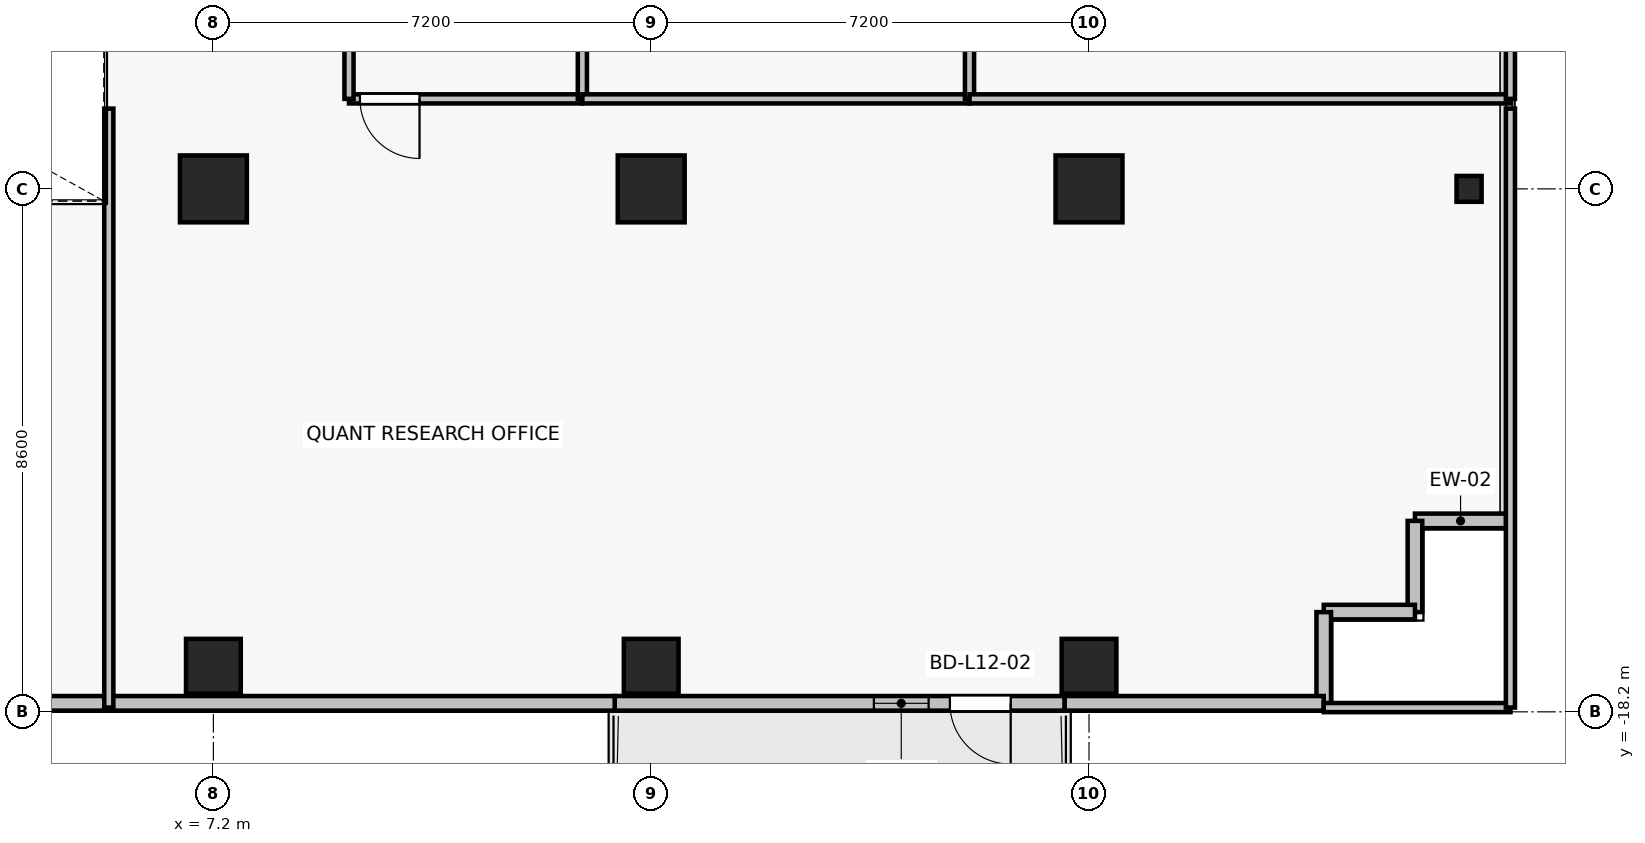
"""IFC4 building model, lengths in metres.
Left out: names, types, materials, properties, quantities, classifications, styles, units other than length and angle.
Written with IfcOpenShell. Run it as: python <this file> out.ifc"""

import sys

from ifc_helpers import new_model, si_unit, direction, frame, frame_2d, origin, origin_2d, place, context, subcontext, project, spatial, rectangle, i_section, extrude, source, transform, mapped, element, fill, save


model = new_model("IFC4")
c1 = context("Model", 3, precision=1e-05, world=origin(), true_north=direction((0.0, 1.0)))
c2 = subcontext(c1, "Body", "Model", "MODEL_VIEW")
j1 = project(units=[si_unit("LENGTHUNIT", "METRE"), si_unit("PLANEANGLEUNIT", "RADIAN")], contexts=[c1])
p1 = place(None, origin())
s1 = spatial("IfcSite", under=j1, at=p1, CompositionType="ELEMENT")
p2 = place(p1, origin())
s2 = spatial("IfcBuilding", under=s1, at=p2, CompositionType="ELEMENT")
p3 = place(p2, frame((0.0, 0.0, 47.2)))
s3 = spatial("IfcBuildingStorey", under=s2, at=p3, CompositionType="ELEMENT", Elevation=47.2)
for number, where, z_axis, x_axis in (
    (1, (7.2, -9.6, 0.0), (0.0, 0.0, 1.0), (1.0, 0.0, 0.0)),
    (2, (14.4, -9.6, 0.0), (0.0, 0.0, 1.0), (1.0, 0.0, 0.0)),
    (3, (21.6, -9.6, 0.0), (0.0, 0.0, 1.0), (1.0, 0.0, 0.0)),
):
    element("IfcColumn", number, at=place(p3, frame(where, z_axis=z_axis, x_axis=x_axis)), inside=s3, PredefinedType="COLUMN", context=c2, shape_type="SweptSolid", body=[
        extrude(rectangle(XDim=1.1, YDim=1.1, at=origin_2d()), origin(), (0.0, 0.0, 1.0), 3.3),
    ])
for number, where, z_axis, x_axis in (
    (4, (7.2, -17.45, 0.0), (0.0, 0.0, 1.0), (1.0, 0.0, 0.0)),
    (5, (14.4, -17.45, 0.0), (0.0, 0.0, 1.0), (1.0, 0.0, 0.0)),
    (6, (21.6, -17.45, 0.0), (0.0, 0.0, 1.0), (1.0, 0.0, 0.0)),
):
    element("IfcColumn", number, at=place(p3, frame(where, z_axis=z_axis, x_axis=x_axis)), inside=s3, PredefinedType="COLUMN", context=c2, shape_type="SweptSolid", body=[
        extrude(rectangle(XDim=0.9, YDim=0.9, at=origin_2d()), origin(), (0.0, 0.0, 1.0), 3.3),
    ])
p4 = place(p3, frame((27.85, -9.6, 0.0), z_axis=(0.0, 0.0, 1.0), x_axis=(1.0, 0.0, 0.0)))
e7 = element("IfcColumn", 7, at=p4, inside=s3, PredefinedType="COLUMN", context=c2, shape_type="SweptSolid", body=[
    extrude(i_section(OverallWidth=0.412, OverallDepth=0.425, WebThickness=0.026, FlangeThickness=0.039, FilletRadius=0.015, at=origin_2d()), origin(), (0.0, 0.0, 1.0), 3.3),
])
p5 = place(p3, frame((21.2, -18.06, 0.0), z_axis=(0.0, 0.0, 1.0), x_axis=(-1.0, 0.0, 0.0)))
e8 = element("IfcWall", 8, at=p5, inside=s3, PredefinedType="SOLIDWALL", context=c2, shape_type="SweptSolid", body=[
    extrude(rectangle(XDim=7.4, YDim=0.24, at=frame_2d((3.7, 0.0))), origin(), (0.0, 0.0, 1.0), 2.665),
])
p6 = place(p5, frame((0.888, 0.0, 0.0)))
e9 = element("IfcOpeningElement", 9, at=p6, cuts=e8, PredefinedType="OPENING", context=c2, shape_type="SweptSolid", body=[
    extrude(rectangle(XDim=1.0, YDim=2.2, at=frame_2d((0.5, 1.1))), frame((0.0, 0.13, 0.0), z_axis=(0.0, -1.0, 0.0), x_axis=(1.0, 0.0, 0.0)), (0.0, 0.0, 1.0), 0.26),
])
p7 = place(p5, frame((2.238, 0.0, 0.85)))
e10 = element("IfcOpeningElement", 10, at=p7, cuts=e8, PredefinedType="OPENING", context=c2, shape_type="SweptSolid", body=[
    extrude(rectangle(XDim=0.9, YDim=1.35, at=frame_2d((0.45, 0.675))), frame((0.0, 0.13, 0.0), z_axis=(0.0, -1.0, 0.0), x_axis=(1.0, 0.0, 0.0)), (0.0, 0.0, 1.0), 0.26),
])
for number, where, z_axis, x_axis in (
    (11, (26.96, -15.06, 0.0), (0.0, 0.0, 1.0), (1.0, 0.0, 0.0)),
    (12, (26.96, -16.56, 0.0), (0.0, 0.0, 1.0), (0.0, 1.0, 0.0)),
    (13, (25.46, -16.56, 0.0), (0.0, 0.0, 1.0), (1.0, 0.0, 0.0)),
    (14, (25.46, -18.06, 0.0), (0.0, 0.0, 1.0), (0.0, 1.0, 0.0)),
):
    element("IfcWall", number, at=place(p3, frame(where, z_axis=z_axis, x_axis=x_axis)), inside=s3, PredefinedType="SOLIDWALL", context=c2, shape_type="SweptSolid", body=[
        extrude(rectangle(XDim=1.5, YDim=0.24, at=frame_2d((0.75, 0.0))), origin(), (0.0, 0.0, 1.0), 3.075),
    ])
p8 = place(p3, frame((21.2, -18.06, 0.0), z_axis=(0.0, 0.0, 1.0), x_axis=(1.0, 0.0, 0.0)))
e15 = element("IfcWall", 15, at=p8, inside=s3, PredefinedType="SOLIDWALL", context=c2, shape_type="SweptSolid", body=[
    extrude(rectangle(XDim=4.26, YDim=0.24, at=frame_2d((2.13, 0.0))), origin(), (0.0, 0.0, 1.0), 3.075),
])
p9 = place(p3, frame((3.34, -18.06, 0.0), z_axis=(0.0, 0.0, 1.0), x_axis=(1.0, 0.0, 0.0)))
e16 = element("IfcWall", 16, at=p9, inside=s3, PredefinedType="SOLIDWALL", context=c2, shape_type="SweptSolid", body=[
    extrude(rectangle(XDim=10.46, YDim=0.24, at=frame_2d((5.23, 0.0))), origin(), (0.0, 0.0, 1.0), 2.665),
])
p10 = place(p3, frame((13.268, -8.12, 0.0), z_axis=(0.0, 0.0, 1.0), x_axis=(-1.0, 0.0, 0.0)))
e17 = element("IfcWall", 17, at=p10, inside=s3, PredefinedType="PARTITIONING", context=c2, shape_type="SweptSolid", body=[
    extrude(rectangle(XDim=3.838, YDim=0.15, at=frame_2d((1.919, 0.0))), origin(), (0.0, 0.0, 1.0), 3.075),
])
p11 = place(p10, frame((2.678, 0.0, 0.0)))
e18 = element("IfcOpeningElement", 18, at=p11, cuts=e17, PredefinedType="OPENING", context=c2, shape_type="SweptSolid", body=[
    extrude(rectangle(XDim=0.98, YDim=2.15, at=frame_2d((0.49, 1.075))), frame((0.0, 0.085, 0.0), z_axis=(0.0, -1.0, 0.0), x_axis=(1.0, 0.0, 0.0)), (0.0, 0.0, 1.0), 0.17),
])
for number, where, z_axis, x_axis in (
    (19, (9.43, -8.12, 0.0), (0.0, 0.0, 1.0), (0.0, 1.0, 0.0)),
    (20, (13.268, -3.83, 0.0), (0.0, 0.0, 1.0), (0.0, -1.0, 0.0)),
):
    element("IfcWall", number, at=place(p3, frame(where, z_axis=z_axis, x_axis=x_axis)), inside=s3, PredefinedType="PARTITIONING", context=c2, shape_type="SweptSolid", body=[
        extrude(rectangle(XDim=4.29, YDim=0.15, at=frame_2d((2.145, 0.0))), origin(), (0.0, 0.0, 1.0), 2.565),
    ])
p12 = place(p3, frame((19.635, -8.12, 0.0), z_axis=(0.0, 0.0, 1.0), x_axis=(-1.0, 0.0, 0.0)))
e21 = element("IfcWall", 21, at=p12, inside=s3, PredefinedType="PARTITIONING", context=c2, shape_type="SweptSolid", body=[
    extrude(rectangle(XDim=6.367, YDim=0.15, at=frame_2d((3.183, 0.0))), origin(), (0.0, 0.0, 1.0), 2.465),
])
p13 = place(p3, frame((19.635, -3.83, 0.0), z_axis=(0.0, 0.0, 1.0), x_axis=(0.0, -1.0, 0.0)))
e22 = element("IfcWall", 22, at=p13, inside=s3, PredefinedType="PARTITIONING", context=c2, shape_type="SweptSolid", body=[
    extrude(rectangle(XDim=4.29, YDim=0.15, at=frame_2d((2.145, 0.0))), origin(), (0.0, 0.0, 1.0), 2.565),
])
p14 = place(p3, frame((28.53, -8.12, 0.0), z_axis=(0.0, 0.0, 1.0), x_axis=(-1.0, 0.0, 0.0)))
e23 = element("IfcWall", 23, at=p14, inside=s3, PredefinedType="PARTITIONING", context=c2, shape_type="SweptSolid", body=[
    extrude(rectangle(XDim=8.895, YDim=0.15, at=frame_2d((4.448, 0.0))), origin(), (0.0, 0.0, 1.0), 2.465),
])
p15 = place(p3, frame((28.53, -3.83, 0.0), z_axis=(0.0, 0.0, 1.0), x_axis=(0.0, -1.0, 0.0)))
e24 = element("IfcWall", 24, at=p15, inside=s3, PredefinedType="PARTITIONING", context=c2, shape_type="SweptSolid", body=[
    extrude(rectangle(XDim=4.29, YDim=0.15, at=frame_2d((2.145, 0.0))), origin(), (0.0, 0.0, 1.0), 2.665),
])
p16 = place(p3, frame((28.53, -18.13, 0.0), z_axis=(0.0, 0.0, 1.0), x_axis=(-1.0, 0.0, 0.0)))
e25 = element("IfcWall", 25, at=p16, inside=s3, PredefinedType="PARTITIONING", context=c2, shape_type="SweptSolid", body=[
    extrude(rectangle(XDim=3.07, YDim=0.15, at=frame_2d((1.535, 0.0))), origin(), (0.0, 0.0, 1.0), 2.665),
])
p17 = place(p3, frame((5.48, -18.13, 0.0), z_axis=(0.0, 0.0, 1.0), x_axis=(0.0, 1.0, 0.0)))
e26 = element("IfcWall", 26, at=p17, inside=s3, PredefinedType="PARTITIONING", context=c2, shape_type="SweptSolid", body=[
    extrude(rectangle(XDim=9.85, YDim=0.15, at=frame_2d((4.925, 0.0))), origin(), (0.0, 0.0, 1.0), 2.465),
])
p18 = place(p3, frame((28.53, -8.28, 0.0), z_axis=(0.0, 0.0, 1.0), x_axis=(0.0, -1.0, 0.0)))
e27 = element("IfcWall", 27, at=p18, inside=s3, PredefinedType="PARTITIONING", context=c2, shape_type="SweptSolid", body=[
    extrude(rectangle(XDim=9.85, YDim=0.15, at=frame_2d((4.925, 0.0))), origin(), (0.0, 0.0, 1.0), 2.665),
])
m1 = source(origin(), c2, "Body", "SweptSolid", [
    extrude(rectangle(XDim=1.0, YDim=2.2, at=frame_2d((0.5, 1.1))), frame((0.0, 0.025, 0.0), z_axis=(0.0, -1.0, 0.0), x_axis=(1.0, 0.0, 0.0)), (0.0, 0.0, 1.0), 0.05),
])
p19 = place(p6, origin())
e28 = element("IfcDoor", 28, at=p19, inside=s3, OperationType="SINGLE_SWING_LEFT", PredefinedType="DOOR", context=c2, shape_type="MappedRepresentation", body=[
    mapped(m1, transform((0.0, 0.0, 0.0), x_axis=(1.0, 0.0, 0.0), y_axis=(0.0, 1.0, 0.0), z_axis=(0.0, 0.0, 1.0), scale=1.0)),
])
fill(e9, e28)
m2 = source(origin(), c2, "Body", "SweptSolid", [
    extrude(rectangle(XDim=0.9, YDim=1.35, at=frame_2d((0.45, 0.675))), frame((0.0, 0.03, 0.0), z_axis=(0.0, -1.0, 0.0), x_axis=(1.0, 0.0, 0.0)), (0.0, 0.0, 1.0), 0.06),
])
p20 = place(p7, origin())
e29 = element("IfcWindow", 29, at=p20, inside=s3, PartitioningType="SINGLE_PANEL", PredefinedType="WINDOW", context=c2, shape_type="MappedRepresentation", body=[
    mapped(m2, transform((0.0, 0.0, 0.0), x_axis=(1.0, 0.0, 0.0), y_axis=(0.0, 1.0, 0.0), z_axis=(0.0, 0.0, 1.0), scale=1.0)),
])
fill(e10, e29)
m3 = source(origin(), c2, "Body", "SweptSolid", [
    extrude(rectangle(XDim=0.98, YDim=2.15, at=frame_2d((0.49, 1.075))), frame((0.0, 0.025, 0.0), z_axis=(0.0, -1.0, 0.0), x_axis=(1.0, 0.0, 0.0)), (0.0, 0.0, 1.0), 0.05),
])
p21 = place(p11, origin())
e30 = element("IfcDoor", 30, at=p21, inside=s3, OperationType="SINGLE_SWING_LEFT", PredefinedType="DOOR", context=c2, shape_type="MappedRepresentation", body=[
    mapped(m3, transform((0.0, 0.0, 0.0), x_axis=(1.0, 0.0, 0.0), y_axis=(0.0, 1.0, 0.0), z_axis=(0.0, 0.0, 1.0), scale=1.0)),
])
fill(e18, e30)
save(model, sys.argv[1])
